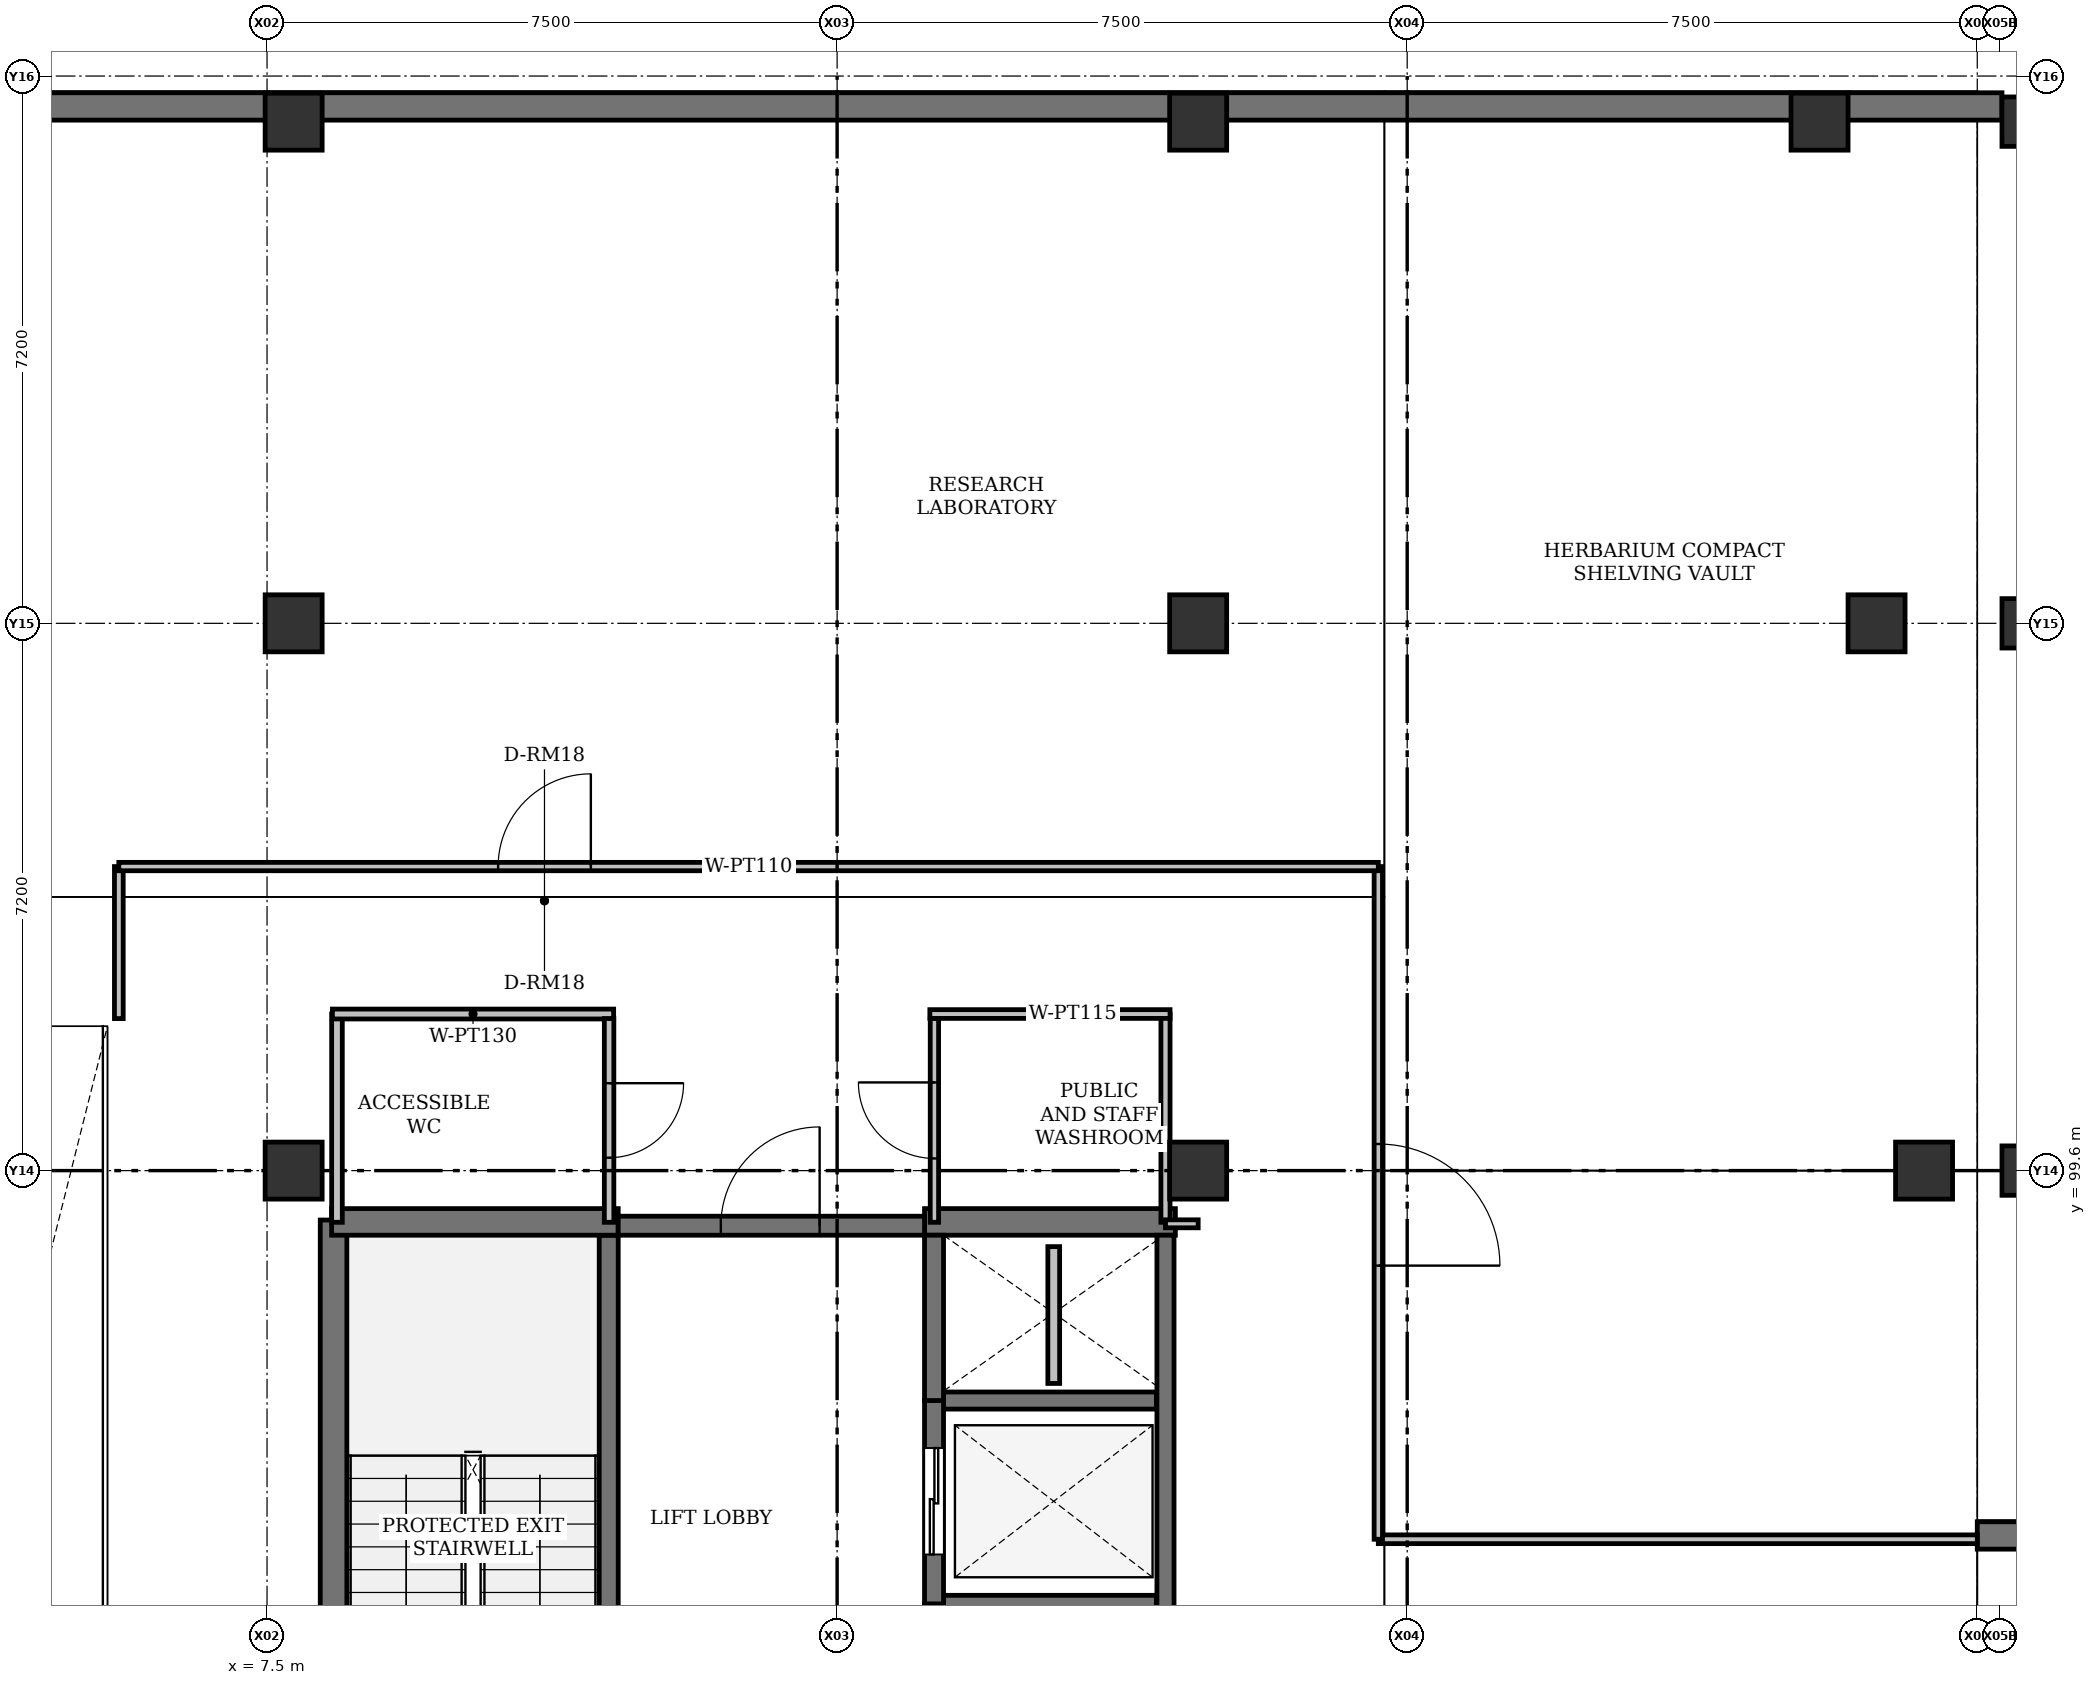
"""IFC4 building model, lengths in metres.
Left out: names, types, materials, properties, quantities, classifications, styles, units other than length and angle.
Written with IfcOpenShell. Run it as: python <this file> out.ifc"""

import sys

from ifc_helpers import new_model, si_unit, direction, frame, frame_2d, origin, origin_2d, place, context, subcontext, project, spatial, rectangle, extrude, element, fill, save


model = new_model("IFC4")
c1 = context("Model", 3, precision=1e-05, world=origin(), true_north=direction((0.0, 1.0)))
c2 = subcontext(c1, "Body", "Model", "MODEL_VIEW")
j1 = project(units=[si_unit("LENGTHUNIT", "METRE"), si_unit("PLANEANGLEUNIT", "RADIAN")], contexts=[c1])
p1 = place(None, origin())
s1 = spatial("IfcSite", under=j1, at=p1, CompositionType="ELEMENT")
p2 = place(p1, origin())
s2 = spatial("IfcBuilding", under=s1, at=p2, CompositionType="ELEMENT")
p3 = place(p2, frame((0.0, 0.0, -4.2)))
s3 = spatial("IfcBuildingStorey", under=s2, at=p3, CompositionType="ELEMENT", Elevation=-4.2)
for number, where, z_axis, x_axis in (
    (1, (7.85, 99.6, 0.0), (0.0, 0.0, 1.0), (1.0, 0.0, 0.0)),
    (2, (19.75, 99.6, 0.0), (0.0, 0.0, 1.0), (1.0, 0.0, 0.0)),
    (3, (29.3, 99.6, 0.0), (0.0, 0.0, 1.0), (1.0, 0.0, 0.0)),
    (4, (7.85, 106.8, 0.0), (0.0, 0.0, 1.0), (1.0, 0.0, 0.0)),
    (5, (19.75, 106.8, 0.0), (0.0, 0.0, 1.0), (1.0, 0.0, 0.0)),
    (6, (28.675, 106.8, 0.0), (0.0, 0.0, 1.0), (1.0, 0.0, 0.0)),
    (7, (7.85, 113.4, 0.0), (0.0, 0.0, 1.0), (1.0, 0.0, 0.0)),
    (8, (19.75, 113.4, 0.0), (0.0, 0.0, 1.0), (1.0, 0.0, 0.0)),
    (9, (27.925, 113.4, 0.0), (0.0, 0.0, 1.0), (1.0, 0.0, 0.0)),
):
    element("IfcColumn", number, at=place(p3, frame(where, z_axis=z_axis, x_axis=x_axis)), inside=s3, PredefinedType="COLUMN", context=c2, shape_type="SweptSolid", body=[
        extrude(rectangle(XDim=0.75, YDim=0.75, at=origin_2d()), origin(), (0.0, 0.0, 1.0), 4.2),
    ])
for number, where, z_axis, x_axis in (
    (10, (30.65, 113.4, 0.0), (0.0, 0.0, 1.0), (1.0, 0.0, 0.0)),
    (11, (30.65, 99.6, 0.0), (0.0, 0.0, 1.0), (1.0, 0.0, 0.0)),
    (12, (30.65, 106.8, 0.0), (0.0, 0.0, 1.0), (1.0, 0.0, 0.0)),
):
    element("IfcColumn", number, at=place(p3, frame(where, z_axis=z_axis, x_axis=x_axis)), inside=s3, PredefinedType="COLUMN", context=c2, shape_type="SweptSolid", body=[
        extrude(rectangle(XDim=0.65, YDim=0.65, at=origin_2d()), origin(), (0.0, 0.0, 1.0), 4.2),
    ])
p4 = place(p3, frame((0.65, 113.6, 0.0), z_axis=(0.0, 0.0, 1.0), x_axis=(1.0, 0.0, 0.0)))
e13 = element("IfcWall", 13, at=p4, inside=s3, PredefinedType="USERDEFINED", context=c2, shape_type="SweptSolid", body=[
    extrude(rectangle(XDim=29.675, YDim=0.36, at=frame_2d((14.837, 0.0))), origin(), (0.0, 0.0, 1.0), 3.95),
])
p5 = place(p3, frame((30.0, 94.8, 0.0), z_axis=(0.0, 0.0, 1.0), x_axis=(1.0, 0.0, 0.0)))
e14 = element("IfcWall", 14, at=p5, inside=s3, PredefinedType="USERDEFINED", context=c2, shape_type="SweptSolid", body=[
    extrude(rectangle(XDim=37.0, YDim=0.36, at=frame_2d((18.5, 0.0))), origin(), (0.0, 0.0, 1.0), 3.95),
])
p6 = place(p3, frame((8.375, 90.775, 0.0), z_axis=(0.0, 0.0, 1.0), x_axis=(0.0, 1.0, 0.0)))
e15 = element("IfcWall", 15, at=p6, inside=s3, PredefinedType="SHEAR", context=c2, shape_type="SweptSolid", body=[
    extrude(rectangle(XDim=8.175, YDim=0.35, at=frame_2d((4.087, 0.0))), origin(), (0.0, 0.0, 1.0), 4.2),
])
p7 = place(p3, frame((11.995, 90.9, 0.0), z_axis=(0.0, 0.0, 1.0), x_axis=(0.0, 1.0, 0.0)))
e16 = element("IfcWall", 16, at=p7, inside=s3, PredefinedType="SHEAR", context=c2, shape_type="SweptSolid", body=[
    extrude(rectangle(XDim=7.85, YDim=0.25, at=frame_2d((3.925, 0.0))), origin(), (0.0, 0.0, 1.0), 4.2),
])
p8 = place(p3, frame((8.35, 98.925, 0.0), z_axis=(0.0, 0.0, 1.0), x_axis=(1.0, 0.0, 0.0)))
e17 = element("IfcWall", 17, at=p8, inside=s3, PredefinedType="SHEAR", context=c2, shape_type="SweptSolid", body=[
    extrude(rectangle(XDim=3.77, YDim=0.35, at=frame_2d((1.885, 0.0))), origin(), (0.0, 0.0, 1.0), 4.2),
])
p9 = place(p3, frame((16.15, 98.925, 0.0), z_axis=(0.0, 0.0, 1.0), x_axis=(1.0, 0.0, 0.0)))
e18 = element("IfcWall", 18, at=p9, inside=s3, PredefinedType="SHEAR", context=c2, shape_type="SweptSolid", body=[
    extrude(rectangle(XDim=3.3, YDim=0.35, at=frame_2d((1.65, 0.0))), origin(), (0.0, 0.0, 1.0), 4.2),
])
p10 = place(p3, frame((12.12, 98.875, 0.0), z_axis=(0.0, 0.0, 1.0), x_axis=(1.0, 0.0, 0.0)))
e19 = element("IfcWall", 19, at=p10, inside=s3, PredefinedType="SHEAR", context=c2, shape_type="SweptSolid", body=[
    extrude(rectangle(XDim=4.03, YDim=0.25, at=frame_2d((2.015, 0.0))), origin(), (0.0, 0.0, 1.0), 4.2),
])
p11 = place(p10, frame((1.35, 0.0, 0.0)))
e20 = element("IfcOpeningElement", 20, at=p11, cuts=e19, PredefinedType="OPENING", context=c2, shape_type="SweptSolid", body=[
    extrude(rectangle(XDim=1.3, YDim=2.2, at=frame_2d((0.65, 1.1))), frame((0.0, 0.125, 0.0), z_axis=(0.0, -1.0, 0.0), x_axis=(1.0, 0.0, 0.0)), (0.0, 0.0, 1.0), 0.25),
])
p12 = place(p3, frame((19.32, 84.8, 0.0), z_axis=(0.0, 0.0, 1.0), x_axis=(0.0, 1.0, 0.0)))
e21 = element("IfcWall", 21, at=p12, inside=s3, PredefinedType="SHEAR", context=c2, shape_type="SweptSolid", body=[
    extrude(rectangle(XDim=13.95, YDim=0.225, at=frame_2d((6.975, 0.0))), origin(), (0.0, 0.0, 1.0), 4.2),
])
for number, where, z_axis, x_axis in (
    (22, (16.4, 93.9, 0.0), (0.0, 0.0, 1.0), (1.0, 0.0, 0.0)),
    (23, (16.4, 96.575, 0.0), (0.0, 0.0, 1.0), (1.0, 0.0, 0.0)),
):
    element("IfcWall", number, at=place(p3, frame(where, z_axis=z_axis, x_axis=x_axis)), inside=s3, PredefinedType="SHEAR", context=c2, shape_type="SweptSolid", body=[
        extrude(rectangle(XDim=2.8, YDim=0.225, at=frame_2d((1.4, 0.0))), origin(), (0.0, 0.0, 1.0), 4.2),
    ])
p13 = place(p3, frame((16.275, 91.725, 0.0), z_axis=(0.0, 0.0, 1.0), x_axis=(0.0, 1.0, 0.0)))
e24 = element("IfcWall", 24, at=p13, inside=s3, PredefinedType="SHEAR", context=c2, shape_type="SweptSolid", body=[
    extrude(rectangle(XDim=2.175, YDim=0.25, at=frame_2d((1.087, 0.0))), origin(), (0.0, 0.0, 1.0), 4.2),
])
p14 = place(p13, frame((0.55, 0.0, 0.0)))
e25 = element("IfcOpeningElement", 25, at=p14, cuts=e24, PredefinedType="OPENING", context=c2, shape_type="SweptSolid", body=[
    extrude(rectangle(XDim=1.05, YDim=2.15, at=frame_2d((0.525, 1.075))), frame((0.0, 0.125, 0.0), z_axis=(0.0, -1.0, 0.0), x_axis=(1.0, 0.0, 0.0)), (0.0, 0.0, 1.0), 0.25),
])
p15 = place(p3, frame((16.275, 93.9, 0.0), z_axis=(0.0, 0.0, 1.0), x_axis=(0.0, 1.0, 0.0)))
e26 = element("IfcWall", 26, at=p15, inside=s3, PredefinedType="SHEAR", context=c2, shape_type="SweptSolid", body=[
    extrude(rectangle(XDim=2.675, YDim=0.25, at=frame_2d((1.337, 0.0))), origin(), (0.0, 0.0, 1.0), 4.2),
])
p16 = place(p15, frame((0.65, 0.0, 0.0)))
e27 = element("IfcOpeningElement", 27, at=p16, cuts=e26, PredefinedType="OPENING", context=c2, shape_type="SweptSolid", body=[
    extrude(rectangle(XDim=1.4, YDim=2.25, at=frame_2d((0.7, 1.125))), frame((0.0, 0.125, 0.0), z_axis=(0.0, -1.0, 0.0), x_axis=(1.0, 0.0, 0.0)), (0.0, 0.0, 1.0), 0.25),
])
p17 = place(p3, frame((16.275, 96.575, 0.0), z_axis=(0.0, 0.0, 1.0), x_axis=(0.0, 1.0, 0.0)))
e28 = element("IfcWall", 28, at=p17, inside=s3, PredefinedType="SHEAR", context=c2, shape_type="SweptSolid", body=[
    extrude(rectangle(XDim=2.175, YDim=0.25, at=frame_2d((1.087, 0.0))), origin(), (0.0, 0.0, 1.0), 4.2),
])
p18 = place(p3, frame((17.85, 96.8, 0.0), z_axis=(0.0, 0.0, 1.0), x_axis=(0.0, 1.0, 0.0)))
e29 = element("IfcWall", 29, at=p18, inside=s3, PredefinedType="PLUMBINGWALL", context=c2, shape_type="SweptSolid", body=[
    extrude(rectangle(XDim=1.8, YDim=0.155, at=frame_2d((0.9, 0.0))), origin(), (0.0, 0.0, 1.0), 4.2),
])
p19 = place(p3, frame((8.42, 98.92, 0.0), z_axis=(0.0, 0.0, 1.0), x_axis=(0.0, 1.0, 0.0)))
e30 = element("IfcWall", 30, at=p19, inside=s3, PredefinedType="PARTITIONING", context=c2, shape_type="SweptSolid", body=[
    extrude(rectangle(XDim=2.74, YDim=0.14, at=frame_2d((1.37, 0.0))), origin(), (0.0, 0.0, 1.0), 3.401),
])
p20 = place(p3, frame((8.36, 101.66, 0.0), z_axis=(0.0, 0.0, 1.0), x_axis=(1.0, 0.0, 0.0)))
e31 = element("IfcWall", 31, at=p20, inside=s3, PredefinedType="PARTITIONING", context=c2, shape_type="SweptSolid", body=[
    extrude(rectangle(XDim=3.7, YDim=0.13, at=frame_2d((1.85, 0.0))), origin(), (0.0, 0.0, 1.0), 3.95),
])
p21 = place(p3, frame((12.0, 101.6, 0.0), z_axis=(0.0, 0.0, 1.0), x_axis=(0.0, -1.0, 0.0)))
e32 = element("IfcWall", 32, at=p21, inside=s3, PredefinedType="PARTITIONING", context=c2, shape_type="SweptSolid", body=[
    extrude(rectangle(XDim=2.68, YDim=0.125, at=frame_2d((1.34, 0.0))), origin(), (0.0, 0.0, 1.0), 3.401),
])
p22 = place(p21, frame((0.85, 0.0, 0.0)))
e33 = element("IfcOpeningElement", 33, at=p22, cuts=e32, PredefinedType="OPENING", context=c2, shape_type="SweptSolid", body=[
    extrude(rectangle(XDim=0.98, YDim=2.1, at=frame_2d((0.49, 1.05))), frame((0.0, 0.062, 0.0), z_axis=(0.0, -1.0, 0.0), x_axis=(1.0, 0.0, 0.0)), (0.0, 0.0, 1.0), 0.125),
])
p23 = place(p3, frame((19.32, 98.92, 0.0), z_axis=(0.0, 0.0, 1.0), x_axis=(0.0, 1.0, 0.0)))
e34 = element("IfcWall", 34, at=p23, inside=s3, PredefinedType="PARTITIONING", context=c2, shape_type="SweptSolid", body=[
    extrude(rectangle(XDim=2.74, YDim=0.12, at=frame_2d((1.37, 0.0))), origin(), (0.0, 0.0, 1.0), 3.401),
])
p24 = place(p3, frame((19.38, 101.66, 0.0), z_axis=(0.0, 0.0, 1.0), x_axis=(-1.0, 0.0, 0.0)))
e35 = element("IfcWall", 35, at=p24, inside=s3, PredefinedType="PARTITIONING", context=c2, shape_type="SweptSolid", body=[
    extrude(rectangle(XDim=3.16, YDim=0.115, at=frame_2d((1.58, 0.0))), origin(), (0.0, 0.0, 1.0), 3.95),
])
p25 = place(p3, frame((16.28, 98.92, 0.0), z_axis=(0.0, 0.0, 1.0), x_axis=(0.0, 1.0, 0.0)))
e36 = element("IfcWall", 36, at=p25, inside=s3, PredefinedType="PARTITIONING", context=c2, shape_type="SweptSolid", body=[
    extrude(rectangle(XDim=2.68, YDim=0.11, at=frame_2d((1.34, 0.0))), origin(), (0.0, 0.0, 1.0), 3.401),
])
p26 = place(p25, frame((0.84, 0.0, 0.0)))
e37 = element("IfcOpeningElement", 37, at=p26, cuts=e36, PredefinedType="OPENING", context=c2, shape_type="SweptSolid", body=[
    extrude(rectangle(XDim=1.0, YDim=2.1, at=frame_2d((0.5, 1.05))), frame((0.0, 0.055, 0.0), z_axis=(0.0, -1.0, 0.0), x_axis=(1.0, 0.0, 0.0)), (0.0, 0.0, 1.0), 0.11),
])
p27 = place(p3, frame((19.75, 98.9, 0.0), z_axis=(0.0, 0.0, 1.0), x_axis=(-1.0, 0.0, 0.0)))
e38 = element("IfcWall", 38, at=p27, inside=s3, PredefinedType="PARTITIONING", context=c2, shape_type="SweptSolid", body=[
    extrude(rectangle(XDim=0.43, YDim=0.105, at=frame_2d((0.215, 0.0))), origin(), (0.0, 0.0, 1.0), 3.477),
])
p28 = place(p3, frame((5.55, 101.6, 0.0), z_axis=(0.0, 0.0, 1.0), x_axis=(0.0, 1.0, 0.0)))
e39 = element("IfcWall", 39, at=p28, inside=s3, PredefinedType="PARTITIONING", context=c2, shape_type="SweptSolid", body=[
    extrude(rectangle(XDim=2.0, YDim=0.115, at=frame_2d((1.0, 0.0))), origin(), (0.0, 0.0, 1.0), 3.627),
])
p29 = place(p3, frame((22.12, 94.75, 0.0), z_axis=(0.0, 0.0, 1.0), x_axis=(1.0, 0.0, 0.0)))
e40 = element("IfcWall", 40, at=p29, inside=s3, PredefinedType="PARTITIONING", context=c2, shape_type="SweptSolid", body=[
    extrude(rectangle(XDim=7.88, YDim=0.115, at=frame_2d((3.94, 0.0))), origin(), (0.0, 0.0, 1.0), 3.527),
])
p30 = place(p3, frame((22.12, 103.6, 0.0), z_axis=(0.0, 0.0, 1.0), x_axis=(0.0, -1.0, 0.0)))
e41 = element("IfcWall", 41, at=p30, inside=s3, PredefinedType="PARTITIONING", context=c2, shape_type="SweptSolid", body=[
    extrude(rectangle(XDim=8.85, YDim=0.11, at=frame_2d((4.425, 0.0))), origin(), (0.0, 0.0, 1.0), 3.401),
])
p31 = place(p30, frame((3.65, 0.0, 0.0)))
e42 = element("IfcOpeningElement", 42, at=p31, cuts=e41, PredefinedType="OPENING", context=c2, shape_type="SweptSolid", body=[
    extrude(rectangle(XDim=1.6, YDim=2.25, at=frame_2d((0.8, 1.125))), frame((0.0, 0.055, 0.0), z_axis=(0.0, -1.0, 0.0), x_axis=(1.0, 0.0, 0.0)), (0.0, 0.0, 1.0), 0.11),
])
p32 = place(p3, frame((5.55, 103.6, 0.0), z_axis=(0.0, 0.0, 1.0), x_axis=(1.0, 0.0, 0.0)))
e43 = element("IfcWall", 43, at=p32, inside=s3, PredefinedType="PARTITIONING", context=c2, shape_type="SweptSolid", body=[
    extrude(rectangle(XDim=16.57, YDim=0.11, at=frame_2d((8.285, 0.0))), origin(), (0.0, 0.0, 1.0), 3.477),
])
p33 = place(p32, frame((4.99, 0.0, 0.0)))
e44 = element("IfcOpeningElement", 44, at=p33, cuts=e43, PredefinedType="OPENING", context=c2, shape_type="SweptSolid", body=[
    extrude(rectangle(XDim=1.22, YDim=2.2, at=frame_2d((0.61, 1.1))), frame((0.0, 0.055, 0.0), z_axis=(0.0, -1.0, 0.0), x_axis=(1.0, 0.0, 0.0)), (0.0, 0.0, 1.0), 0.11),
])
p34 = place(p11, origin())
e45 = element("IfcDoor", 45, at=p34, inside=s3, OperationType="SINGLE_SWING_RIGHT", PredefinedType="DOOR", context=c2, shape_type="SweptSolid", body=[
    extrude(rectangle(XDim=1.3, YDim=2.2, at=frame_2d((0.65, 1.1))), frame((0.0, 0.025, 0.0), z_axis=(0.0, -1.0, 0.0), x_axis=(1.0, 0.0, 0.0)), (0.0, 0.0, 1.0), 0.05),
])
fill(e20, e45)
p35 = place(p16, origin())
e46 = element("IfcDoor", 46, at=p35, inside=s3, OperationType="SLIDING_TO_LEFT", PredefinedType="DOOR", context=c2, shape_type="SweptSolid", body=[
    extrude(rectangle(XDim=1.4, YDim=2.25, at=frame_2d((0.7, 1.125))), frame((0.0, 0.025, 0.0), z_axis=(0.0, -1.0, 0.0), x_axis=(1.0, 0.0, 0.0)), (0.0, 0.0, 1.0), 0.05),
])
fill(e27, e46)
p36 = place(p22, origin())
e47 = element("IfcDoor", 47, at=p36, inside=s3, OperationType="SINGLE_SWING_LEFT", PredefinedType="DOOR", context=c2, shape_type="SweptSolid", body=[
    extrude(rectangle(XDim=0.98, YDim=2.1, at=frame_2d((0.49, 1.05))), frame((0.0, 0.025, 0.0), z_axis=(0.0, -1.0, 0.0), x_axis=(1.0, 0.0, 0.0)), (0.0, 0.0, 1.0), 0.05),
])
fill(e33, e47)
p37 = place(p26, origin())
e48 = element("IfcDoor", 48, at=p37, inside=s3, OperationType="SINGLE_SWING_RIGHT", PredefinedType="DOOR", context=c2, shape_type="SweptSolid", body=[
    extrude(rectangle(XDim=1.0, YDim=2.1, at=frame_2d((0.5, 1.05))), frame((0.0, 0.025, 0.0), z_axis=(0.0, -1.0, 0.0), x_axis=(1.0, 0.0, 0.0)), (0.0, 0.0, 1.0), 0.05),
])
fill(e37, e48)
p38 = place(p31, origin())
e49 = element("IfcDoor", 49, at=p38, inside=s3, OperationType="SINGLE_SWING_RIGHT", PredefinedType="DOOR", context=c2, shape_type="SweptSolid", body=[
    extrude(rectangle(XDim=1.6, YDim=2.25, at=frame_2d((0.8, 1.125))), frame((0.0, 0.025, 0.0), z_axis=(0.0, -1.0, 0.0), x_axis=(1.0, 0.0, 0.0)), (0.0, 0.0, 1.0), 0.05),
])
fill(e42, e49)
p39 = place(p33, origin())
e50 = element("IfcDoor", 50, at=p39, inside=s3, OperationType="SINGLE_SWING_RIGHT", PredefinedType="DOOR", context=c2, shape_type="SweptSolid", body=[
    extrude(rectangle(XDim=1.22, YDim=2.2, at=frame_2d((0.61, 1.1))), frame((0.0, 0.025, 0.0), z_axis=(0.0, -1.0, 0.0), x_axis=(1.0, 0.0, 0.0)), (0.0, 0.0, 1.0), 0.05),
])
fill(e44, e50)
save(model, sys.argv[1])
